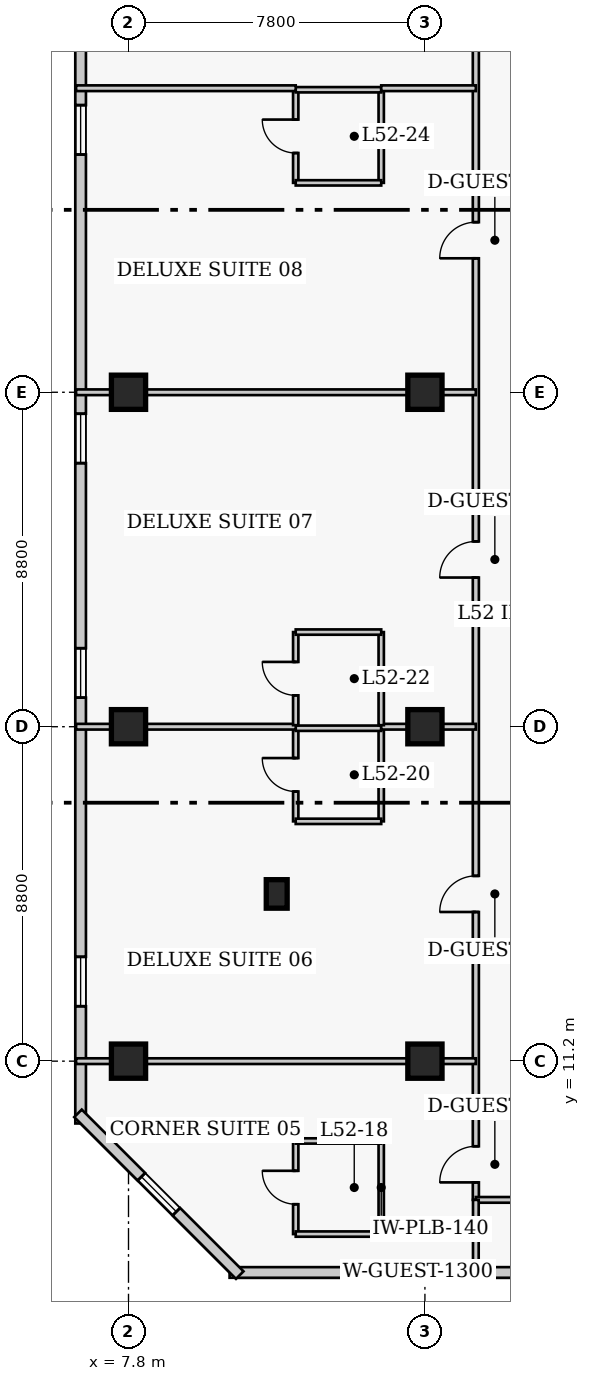
"""IFC4 building model, lengths in metres.
Left out: names, types, materials, properties, quantities, classifications, styles, units other than length and angle.
Written with IfcOpenShell. Run it as: python <this file> out.ifc"""

import sys

from ifc_helpers import new_model, si_unit, direction, frame, frame_2d, origin, origin_2d, place, context, subcontext, project, spatial, rectangle, extrude, element, fill, save


model = new_model("IFC4")
c1 = context("Model", 3, precision=1e-05, world=origin(), true_north=direction((0.0, 1.0)))
c2 = subcontext(c1, "Body", "Model", "MODEL_VIEW")
j1 = project(units=[si_unit("LENGTHUNIT", "METRE"), si_unit("PLANEANGLEUNIT", "RADIAN")], contexts=[c1])
p1 = place(None, origin())
s1 = spatial("IfcSite", under=j1, at=p1, CompositionType="ELEMENT")
p2 = place(p1, origin())
s2 = spatial("IfcBuilding", under=s1, at=p2, CompositionType="ELEMENT")
p3 = place(p2, frame((0.0, 0.0, 208.5)))
s3 = spatial("IfcBuildingStorey", under=s2, at=p3, CompositionType="ELEMENT", Elevation=208.5)
for number, where, z_axis, x_axis in (
    (1, (7.8, 11.2, 0.0), (0.0, 0.0, 1.0), (1.0, 0.0, 0.0)),
    (2, (7.8, 20.0, 0.0), (0.0, 0.0, 1.0), (1.0, 0.0, 0.0)),
    (3, (7.8, 28.8, 0.0), (0.0, 0.0, 1.0), (1.0, 0.0, 0.0)),
    (4, (15.6, 11.2, 0.0), (0.0, 0.0, 1.0), (1.0, 0.0, 0.0)),
    (5, (15.6, 20.0, 0.0), (0.0, 0.0, 1.0), (1.0, 0.0, 0.0)),
    (6, (15.6, 28.8, 0.0), (0.0, 0.0, 1.0), (1.0, 0.0, 0.0)),
):
    element("IfcColumn", number, at=place(p3, frame(where, z_axis=z_axis, x_axis=x_axis)), inside=s3, PredefinedType="COLUMN", context=c2, shape_type="SweptSolid", body=[
        extrude(rectangle(XDim=0.9, YDim=0.9, at=origin_2d()), origin(), (0.0, 0.0, 1.0), 3.9),
    ])
p4 = place(p3, frame((11.7, 15.6, 0.0), z_axis=(0.0, 0.0, 1.0), x_axis=(1.0, 0.0, 0.0)))
e7 = element("IfcColumn", 7, at=p4, inside=s3, PredefinedType="PILASTER", context=c2, shape_type="SweptSolid", body=[
    extrude(rectangle(XDim=0.55, YDim=0.75, at=origin_2d()), origin(), (0.0, 0.0, 1.0), 3.9),
])
p5 = place(p3, frame((10.46, 5.64, 0.0), z_axis=(0.0, 0.0, 1.0), x_axis=(1.0, 0.0, 0.0)))
e8 = element("IfcWall", 8, at=p5, inside=s3, PredefinedType="SOLIDWALL", context=c2, shape_type="SweptSolid", body=[
    extrude(rectangle(XDim=25.83, YDim=0.28, at=frame_2d((12.915, 0.0))), origin(), (0.0, 0.0, 1.0), 3.65),
])
p6 = place(p5, frame((16.14, 0.0, 0.0)))
e9 = element("IfcOpeningElement", 9, at=p6, cuts=e8, PredefinedType="OPENING", context=c2, shape_type="SweptSolid", body=[
    extrude(rectangle(XDim=1.4, YDim=2.15, at=frame_2d((0.7, 1.075))), frame((0.0, 0.15, 0.0), z_axis=(0.0, -1.0, 0.0), x_axis=(1.0, 0.0, 0.0)), (0.0, 0.0, 1.0), 0.3),
])
p7 = place(p5, frame((4.305, 0.0, 0.85)))
e10 = element("IfcOpeningElement", 10, at=p7, cuts=e8, PredefinedType="OPENING", context=c2, shape_type="SweptSolid", body=[
    extrude(rectangle(XDim=1.3, YDim=1.7, at=frame_2d((0.65, 0.85))), frame((0.0, 0.15, 0.0), z_axis=(0.0, -1.0, 0.0), x_axis=(1.0, 0.0, 0.0)), (0.0, 0.0, 1.0), 0.3),
])
p8 = place(p5, frame((11.615, 0.0, 0.85)))
e11 = element("IfcOpeningElement", 11, at=p8, cuts=e8, PredefinedType="OPENING", context=c2, shape_type="SweptSolid", body=[
    extrude(rectangle(XDim=1.3, YDim=1.7, at=frame_2d((0.65, 0.85))), frame((0.0, 0.15, 0.0), z_axis=(0.0, -1.0, 0.0), x_axis=(1.0, 0.0, 0.0)), (0.0, 0.0, 1.0), 0.3),
])
p9 = place(p5, frame((20.875, 0.0, 0.85)))
e12 = element("IfcOpeningElement", 12, at=p9, cuts=e8, PredefinedType="OPENING", context=c2, shape_type="SweptSolid", body=[
    extrude(rectangle(XDim=1.3, YDim=1.7, at=frame_2d((0.65, 0.85))), frame((0.0, 0.15, 0.0), z_axis=(0.0, -1.0, 0.0), x_axis=(1.0, 0.0, 0.0)), (0.0, 0.0, 1.0), 0.3),
])
p10 = place(p3, frame((6.54, 39.44, 0.0), z_axis=(0.0, 0.0, 1.0), x_axis=(0.0, -1.0, 0.0)))
e13 = element("IfcWall", 13, at=p10, inside=s3, PredefinedType="SOLIDWALL", context=c2, shape_type="SweptSolid", body=[
    extrude(rectangle(XDim=29.88, YDim=0.28, at=frame_2d((14.94, 0.0))), origin(), (0.0, 0.0, 1.0), 3.65),
])
p11 = place(p10, frame((3.085, 0.0, 0.85)))
e14 = element("IfcOpeningElement", 14, at=p11, cuts=e13, PredefinedType="OPENING", context=c2, shape_type="SweptSolid", body=[
    extrude(rectangle(XDim=1.3, YDim=1.7, at=frame_2d((0.65, 0.85))), frame((0.0, 0.15, 0.0), z_axis=(0.0, -1.0, 0.0), x_axis=(1.0, 0.0, 0.0)), (0.0, 0.0, 1.0), 0.3),
])
p12 = place(p10, frame((11.205, 0.0, 0.85)))
e15 = element("IfcOpeningElement", 15, at=p12, cuts=e13, PredefinedType="OPENING", context=c2, shape_type="SweptSolid", body=[
    extrude(rectangle(XDim=1.3, YDim=1.7, at=frame_2d((0.65, 0.85))), frame((0.0, 0.15, 0.0), z_axis=(0.0, -1.0, 0.0), x_axis=(1.0, 0.0, 0.0)), (0.0, 0.0, 1.0), 0.3),
])
p13 = place(p10, frame((17.375, 0.0, 0.85)))
e16 = element("IfcOpeningElement", 16, at=p13, cuts=e13, PredefinedType="OPENING", context=c2, shape_type="SweptSolid", body=[
    extrude(rectangle(XDim=1.3, YDim=1.7, at=frame_2d((0.65, 0.85))), frame((0.0, 0.15, 0.0), z_axis=(0.0, -1.0, 0.0), x_axis=(1.0, 0.0, 0.0)), (0.0, 0.0, 1.0), 0.3),
])
p14 = place(p10, frame((25.495, 0.0, 0.85)))
e17 = element("IfcOpeningElement", 17, at=p14, cuts=e13, PredefinedType="OPENING", context=c2, shape_type="SweptSolid", body=[
    extrude(rectangle(XDim=1.3, YDim=1.7, at=frame_2d((0.65, 0.85))), frame((0.0, 0.15, 0.0), z_axis=(0.0, -1.0, 0.0), x_axis=(1.0, 0.0, 0.0)), (0.0, 0.0, 1.0), 0.3),
])
p15 = place(p3, frame((6.471, 9.827, 0.0), z_axis=(0.0, 0.0, 1.0), x_axis=(0.707106781187, -0.707106781187, 0.0)))
e18 = element("IfcWall", 18, at=p15, inside=s3, PredefinedType="SOLIDWALL", context=c2, shape_type="SweptSolid", body=[
    extrude(rectangle(XDim=6.02, YDim=0.28, at=frame_2d((3.01, 0.0))), origin(), (0.0, 0.0, 1.0), 3.65),
])
p16 = place(p15, frame((2.36, 0.0, 0.85)))
e19 = element("IfcOpeningElement", 19, at=p16, cuts=e18, PredefinedType="OPENING", context=c2, shape_type="SweptSolid", body=[
    extrude(rectangle(XDim=1.3, YDim=1.7, at=frame_2d((0.65, 0.85))), frame((0.0, 0.15, 0.0), z_axis=(0.0, -1.0, 0.0), x_axis=(1.0, 0.0, 0.0)), (0.0, 0.0, 1.0), 0.3),
])
p17 = place(p3, frame((16.94, 7.55, 0.0), z_axis=(0.0, 0.0, 1.0), x_axis=(0.0, 1.0, 0.0)))
e20 = element("IfcWall", 20, at=p17, inside=s3, PredefinedType="PARTITIONING", context=c2, shape_type="SweptSolid", body=[
    extrude(rectangle(XDim=33.1, YDim=0.16, at=frame_2d((16.55, 0.0))), origin(), (0.0, 0.0, 1.0), 3.65),
])
p18 = place(p17, frame((0.46, 0.0, 0.0)))
e21 = element("IfcOpeningElement", 21, at=p18, cuts=e20, PredefinedType="OPENING", context=c2, shape_type="SweptSolid", body=[
    extrude(rectangle(XDim=0.95, YDim=2.1, at=frame_2d((0.475, 1.05))), frame((0.0, 0.09, 0.0), z_axis=(0.0, -1.0, 0.0), x_axis=(1.0, 0.0, 0.0)), (0.0, 0.0, 1.0), 0.18),
])
p19 = place(p17, frame((7.575, 0.0, 0.0)))
e22 = element("IfcOpeningElement", 22, at=p19, cuts=e20, PredefinedType="OPENING", context=c2, shape_type="SweptSolid", body=[
    extrude(rectangle(XDim=0.95, YDim=2.1, at=frame_2d((0.475, 1.05))), frame((0.0, 0.09, 0.0), z_axis=(0.0, -1.0, 0.0), x_axis=(1.0, 0.0, 0.0)), (0.0, 0.0, 1.0), 0.18),
])
p20 = place(p17, frame((16.375, 0.0, 0.0)))
e23 = element("IfcOpeningElement", 23, at=p20, cuts=e20, PredefinedType="OPENING", context=c2, shape_type="SweptSolid", body=[
    extrude(rectangle(XDim=0.95, YDim=2.1, at=frame_2d((0.475, 1.05))), frame((0.0, 0.09, 0.0), z_axis=(0.0, -1.0, 0.0), x_axis=(1.0, 0.0, 0.0)), (0.0, 0.0, 1.0), 0.18),
])
p21 = place(p17, frame((24.775, 0.0, 0.0)))
e24 = element("IfcOpeningElement", 24, at=p21, cuts=e20, PredefinedType="OPENING", context=c2, shape_type="SweptSolid", body=[
    extrude(rectangle(XDim=0.95, YDim=2.1, at=frame_2d((0.475, 1.05))), frame((0.0, 0.09, 0.0), z_axis=(0.0, -1.0, 0.0), x_axis=(1.0, 0.0, 0.0)), (0.0, 0.0, 1.0), 0.18),
])
p22 = place(p17, frame((31.66, 0.0, 0.0)))
e25 = element("IfcOpeningElement", 25, at=p22, cuts=e20, PredefinedType="OPENING", context=c2, shape_type="SweptSolid", body=[
    extrude(rectangle(XDim=1.0, YDim=2.15, at=frame_2d((0.5, 1.075))), frame((0.0, 0.09, 0.0), z_axis=(0.0, -1.0, 0.0), x_axis=(1.0, 0.0, 0.0)), (0.0, 0.0, 1.0), 0.18),
])
p23 = place(p3, frame((16.94, 7.55, 0.0), z_axis=(0.0, 0.0, 1.0), x_axis=(1.0, 0.0, 0.0)))
e26 = element("IfcWall", 26, at=p23, inside=s3, PredefinedType="PARTITIONING", context=c2, shape_type="SweptSolid", body=[
    extrude(rectangle(XDim=2.22, YDim=0.15, at=frame_2d((1.11, 0.0))), origin(), (0.0, 0.0, 1.0), 3.65),
])
p24 = place(p3, frame((16.94, 5.52, 0.0), z_axis=(0.0, 0.0, 1.0), x_axis=(0.0, 1.0, 0.0)))
e27 = element("IfcWall", 27, at=p24, inside=s3, PredefinedType="PARTITIONING", context=c2, shape_type="SweptSolid", body=[
    extrude(rectangle(XDim=2.03, YDim=0.15, at=frame_2d((1.015, 0.0))), origin(), (0.0, 0.0, 1.0), 3.65),
])
p25 = place(p3, frame((12.2, 6.65, 0.0), z_axis=(0.0, 0.0, 1.0), x_axis=(0.0, 1.0, 0.0)))
e28 = element("IfcWall", 28, at=p25, inside=s3, PredefinedType="PLUMBINGWALL", context=c2, shape_type="SweptSolid", body=[
    extrude(rectangle(XDim=2.45, YDim=0.14, at=frame_2d((1.225, 0.0))), origin(), (0.0, 0.0, 1.0), 3.65),
])
p26 = place(p25, frame((0.785, 0.0, 0.0)))
e29 = element("IfcOpeningElement", 29, at=p26, cuts=e28, PredefinedType="OPENING", context=c2, shape_type="SweptSolid", body=[
    extrude(rectangle(XDim=0.88, YDim=2.05, at=frame_2d((0.44, 1.025))), frame((0.0, 0.08, 0.0), z_axis=(0.0, -1.0, 0.0), x_axis=(1.0, 0.0, 0.0)), (0.0, 0.0, 1.0), 0.16),
])
p27 = place(p3, frame((14.45, 6.65, 0.0), z_axis=(0.0, 0.0, 1.0), x_axis=(0.0, 1.0, 0.0)))
e30 = element("IfcWall", 30, at=p27, inside=s3, PredefinedType="PLUMBINGWALL", context=c2, shape_type="SweptSolid", body=[
    extrude(rectangle(XDim=2.45, YDim=0.14, at=frame_2d((1.225, 0.0))), origin(), (0.0, 0.0, 1.0), 3.65),
])
for number, where, z_axis, x_axis in (
    (31, (12.2, 6.65, 0.0), (0.0, 0.0, 1.0), (1.0, 0.0, 0.0)),
    (32, (12.2, 9.1, 0.0), (0.0, 0.0, 1.0), (1.0, 0.0, 0.0)),
):
    element("IfcWall", number, at=place(p3, frame(where, z_axis=z_axis, x_axis=x_axis)), inside=s3, PredefinedType="PLUMBINGWALL", context=c2, shape_type="SweptSolid", body=[
        extrude(rectangle(XDim=2.25, YDim=0.14, at=frame_2d((1.125, 0.0))), origin(), (0.0, 0.0, 1.0), 3.65),
    ])
p28 = place(p3, frame((6.42, 11.2, 0.0), z_axis=(0.0, 0.0, 1.0), x_axis=(1.0, 0.0, 0.0)))
e33 = element("IfcWall", 33, at=p28, inside=s3, PredefinedType="PARTITIONING", context=c2, shape_type="SweptSolid", body=[
    extrude(rectangle(XDim=10.52, YDim=0.15, at=frame_2d((5.26, 0.0))), origin(), (0.0, 0.0, 1.0), 2.878),
])
p29 = place(p3, frame((12.2, 17.51, 0.0), z_axis=(0.0, 0.0, 1.0), x_axis=(0.0, 1.0, 0.0)))
e34 = element("IfcWall", 34, at=p29, inside=s3, PredefinedType="PLUMBINGWALL", context=c2, shape_type="SweptSolid", body=[
    extrude(rectangle(XDim=2.45, YDim=0.14, at=frame_2d((1.225, 0.0))), origin(), (0.0, 0.0, 1.0), 3.65),
])
p30 = place(p29, frame((0.785, 0.0, 0.0)))
e35 = element("IfcOpeningElement", 35, at=p30, cuts=e34, PredefinedType="OPENING", context=c2, shape_type="SweptSolid", body=[
    extrude(rectangle(XDim=0.88, YDim=2.05, at=frame_2d((0.44, 1.025))), frame((0.0, 0.08, 0.0), z_axis=(0.0, -1.0, 0.0), x_axis=(1.0, 0.0, 0.0)), (0.0, 0.0, 1.0), 0.16),
])
p31 = place(p3, frame((14.45, 17.51, 0.0), z_axis=(0.0, 0.0, 1.0), x_axis=(0.0, 1.0, 0.0)))
e36 = element("IfcWall", 36, at=p31, inside=s3, PredefinedType="PLUMBINGWALL", context=c2, shape_type="SweptSolid", body=[
    extrude(rectangle(XDim=2.45, YDim=0.14, at=frame_2d((1.225, 0.0))), origin(), (0.0, 0.0, 1.0), 3.65),
])
p32 = place(p3, frame((12.2, 17.51, 0.0), z_axis=(0.0, 0.0, 1.0), x_axis=(1.0, 0.0, 0.0)))
e37 = element("IfcWall", 37, at=p32, inside=s3, PredefinedType="PLUMBINGWALL", context=c2, shape_type="SweptSolid", body=[
    extrude(rectangle(XDim=2.25, YDim=0.14, at=frame_2d((1.125, 0.0))), origin(), (0.0, 0.0, 1.0), 3.65),
])
p33 = place(p3, frame((12.2, 19.96, 0.0), z_axis=(0.0, 0.0, 1.0), x_axis=(1.0, 0.0, 0.0)))
e38 = element("IfcWall", 38, at=p33, inside=s3, PredefinedType="PLUMBINGWALL", context=c2, shape_type="SweptSolid", body=[
    extrude(rectangle(XDim=2.25, YDim=0.14, at=frame_2d((1.125, 0.0))), origin(), (0.0, 0.0, 1.0), 3.038),
])
p34 = place(p3, frame((6.42, 20.0, 0.0), z_axis=(0.0, 0.0, 1.0), x_axis=(1.0, 0.0, 0.0)))
e39 = element("IfcWall", 39, at=p34, inside=s3, PredefinedType="PARTITIONING", context=c2, shape_type="SweptSolid", body=[
    extrude(rectangle(XDim=5.78, YDim=0.15, at=frame_2d((2.89, 0.0))), origin(), (0.0, 0.0, 1.0), 2.878),
])
p35 = place(p3, frame((14.45, 20.0, 0.0), z_axis=(0.0, 0.0, 1.0), x_axis=(1.0, 0.0, 0.0)))
e40 = element("IfcWall", 40, at=p35, inside=s3, PredefinedType="PARTITIONING", context=c2, shape_type="SweptSolid", body=[
    extrude(rectangle(XDim=2.49, YDim=0.15, at=frame_2d((1.245, 0.0))), origin(), (0.0, 0.0, 1.0), 2.878),
])
p36 = place(p3, frame((12.2, 20.04, 0.0), z_axis=(0.0, 0.0, 1.0), x_axis=(0.0, 1.0, 0.0)))
e41 = element("IfcWall", 41, at=p36, inside=s3, PredefinedType="PLUMBINGWALL", context=c2, shape_type="SweptSolid", body=[
    extrude(rectangle(XDim=2.45, YDim=0.14, at=frame_2d((1.225, 0.0))), origin(), (0.0, 0.0, 1.0), 3.65),
])
p37 = place(p36, frame((0.785, 0.0, 0.0)))
e42 = element("IfcOpeningElement", 42, at=p37, cuts=e41, PredefinedType="OPENING", context=c2, shape_type="SweptSolid", body=[
    extrude(rectangle(XDim=0.88, YDim=2.05, at=frame_2d((0.44, 1.025))), frame((0.0, 0.08, 0.0), z_axis=(0.0, -1.0, 0.0), x_axis=(1.0, 0.0, 0.0)), (0.0, 0.0, 1.0), 0.16),
])
p38 = place(p3, frame((14.45, 20.04, 0.0), z_axis=(0.0, 0.0, 1.0), x_axis=(0.0, 1.0, 0.0)))
e43 = element("IfcWall", 43, at=p38, inside=s3, PredefinedType="PLUMBINGWALL", context=c2, shape_type="SweptSolid", body=[
    extrude(rectangle(XDim=2.45, YDim=0.14, at=frame_2d((1.225, 0.0))), origin(), (0.0, 0.0, 1.0), 3.65),
])
p39 = place(p3, frame((12.2, 22.49, 0.0), z_axis=(0.0, 0.0, 1.0), x_axis=(1.0, 0.0, 0.0)))
e44 = element("IfcWall", 44, at=p39, inside=s3, PredefinedType="PLUMBINGWALL", context=c2, shape_type="SweptSolid", body=[
    extrude(rectangle(XDim=2.25, YDim=0.14, at=frame_2d((1.125, 0.0))), origin(), (0.0, 0.0, 1.0), 3.65),
])
p40 = place(p3, frame((6.42, 28.8, 0.0), z_axis=(0.0, 0.0, 1.0), x_axis=(1.0, 0.0, 0.0)))
e45 = element("IfcWall", 45, at=p40, inside=s3, PredefinedType="PARTITIONING", context=c2, shape_type="SweptSolid", body=[
    extrude(rectangle(XDim=10.52, YDim=0.15, at=frame_2d((5.26, 0.0))), origin(), (0.0, 0.0, 1.0), 2.878),
])
p41 = place(p3, frame((12.2, 34.31, 0.0), z_axis=(0.0, 0.0, 1.0), x_axis=(0.0, 1.0, 0.0)))
e46 = element("IfcWall", 46, at=p41, inside=s3, PredefinedType="PLUMBINGWALL", context=c2, shape_type="SweptSolid", body=[
    extrude(rectangle(XDim=2.45, YDim=0.14, at=frame_2d((1.225, 0.0))), origin(), (0.0, 0.0, 1.0), 3.65),
])
p42 = place(p41, frame((0.785, 0.0, 0.0)))
e47 = element("IfcOpeningElement", 47, at=p42, cuts=e46, PredefinedType="OPENING", context=c2, shape_type="SweptSolid", body=[
    extrude(rectangle(XDim=0.88, YDim=2.05, at=frame_2d((0.44, 1.025))), frame((0.0, 0.08, 0.0), z_axis=(0.0, -1.0, 0.0), x_axis=(1.0, 0.0, 0.0)), (0.0, 0.0, 1.0), 0.16),
])
p43 = place(p3, frame((14.45, 34.31, 0.0), z_axis=(0.0, 0.0, 1.0), x_axis=(0.0, 1.0, 0.0)))
e48 = element("IfcWall", 48, at=p43, inside=s3, PredefinedType="PLUMBINGWALL", context=c2, shape_type="SweptSolid", body=[
    extrude(rectangle(XDim=2.45, YDim=0.14, at=frame_2d((1.225, 0.0))), origin(), (0.0, 0.0, 1.0), 3.65),
])
for number, where, z_axis, x_axis in (
    (49, (12.2, 34.31, 0.0), (0.0, 0.0, 1.0), (1.0, 0.0, 0.0)),
    (50, (12.2, 36.76, 0.0), (0.0, 0.0, 1.0), (1.0, 0.0, 0.0)),
):
    element("IfcWall", number, at=place(p3, frame(where, z_axis=z_axis, x_axis=x_axis)), inside=s3, PredefinedType="PLUMBINGWALL", context=c2, shape_type="SweptSolid", body=[
        extrude(rectangle(XDim=2.25, YDim=0.14, at=frame_2d((1.125, 0.0))), origin(), (0.0, 0.0, 1.0), 3.65),
    ])
p44 = place(p3, frame((6.42, 36.8, 0.0), z_axis=(0.0, 0.0, 1.0), x_axis=(1.0, 0.0, 0.0)))
e51 = element("IfcWall", 51, at=p44, inside=s3, PredefinedType="PARTITIONING", context=c2, shape_type="SweptSolid", body=[
    extrude(rectangle(XDim=5.78, YDim=0.15, at=frame_2d((2.89, 0.0))), origin(), (0.0, 0.0, 1.0), 3.65),
])
p45 = place(p3, frame((14.45, 36.8, 0.0), z_axis=(0.0, 0.0, 1.0), x_axis=(1.0, 0.0, 0.0)))
e52 = element("IfcWall", 52, at=p45, inside=s3, PredefinedType="PARTITIONING", context=c2, shape_type="SweptSolid", body=[
    extrude(rectangle(XDim=2.49, YDim=0.15, at=frame_2d((1.245, 0.0))), origin(), (0.0, 0.0, 1.0), 3.65),
])
p46 = place(p7, origin())
e53 = element("IfcWindow", 53, at=p46, inside=s3, PartitioningType="SINGLE_PANEL", PredefinedType="WINDOW", context=c2, shape_type="SweptSolid", body=[
    extrude(rectangle(XDim=1.3, YDim=1.7, at=frame_2d((0.65, 0.85))), frame((0.0, 0.03, 0.0), z_axis=(0.0, -1.0, 0.0), x_axis=(1.0, 0.0, 0.0)), (0.0, 0.0, 1.0), 0.06),
])
fill(e10, e53)
p47 = place(p11, origin())
e54 = element("IfcWindow", 54, at=p47, inside=s3, PartitioningType="SINGLE_PANEL", PredefinedType="WINDOW", context=c2, shape_type="SweptSolid", body=[
    extrude(rectangle(XDim=1.3, YDim=1.7, at=frame_2d((0.65, 0.85))), frame((0.0, 0.03, 0.0), z_axis=(0.0, -1.0, 0.0), x_axis=(1.0, 0.0, 0.0)), (0.0, 0.0, 1.0), 0.06),
])
fill(e14, e54)
p48 = place(p12, origin())
e55 = element("IfcWindow", 55, at=p48, inside=s3, PartitioningType="SINGLE_PANEL", PredefinedType="WINDOW", context=c2, shape_type="SweptSolid", body=[
    extrude(rectangle(XDim=1.3, YDim=1.7, at=frame_2d((0.65, 0.85))), frame((0.0, 0.03, 0.0), z_axis=(0.0, -1.0, 0.0), x_axis=(1.0, 0.0, 0.0)), (0.0, 0.0, 1.0), 0.06),
])
fill(e15, e55)
p49 = place(p13, origin())
e56 = element("IfcWindow", 56, at=p49, inside=s3, PartitioningType="SINGLE_PANEL", PredefinedType="WINDOW", context=c2, shape_type="SweptSolid", body=[
    extrude(rectangle(XDim=1.3, YDim=1.7, at=frame_2d((0.65, 0.85))), frame((0.0, 0.03, 0.0), z_axis=(0.0, -1.0, 0.0), x_axis=(1.0, 0.0, 0.0)), (0.0, 0.0, 1.0), 0.06),
])
fill(e16, e56)
p50 = place(p14, origin())
e57 = element("IfcWindow", 57, at=p50, inside=s3, PartitioningType="SINGLE_PANEL", PredefinedType="WINDOW", context=c2, shape_type="SweptSolid", body=[
    extrude(rectangle(XDim=1.3, YDim=1.7, at=frame_2d((0.65, 0.85))), frame((0.0, 0.03, 0.0), z_axis=(0.0, -1.0, 0.0), x_axis=(1.0, 0.0, 0.0)), (0.0, 0.0, 1.0), 0.06),
])
fill(e17, e57)
p51 = place(p16, origin())
e58 = element("IfcWindow", 58, at=p51, inside=s3, PartitioningType="SINGLE_PANEL", PredefinedType="WINDOW", context=c2, shape_type="SweptSolid", body=[
    extrude(rectangle(XDim=1.3, YDim=1.7, at=frame_2d((0.65, 0.85))), frame((0.0, 0.03, 0.0), z_axis=(0.0, -1.0, 0.0), x_axis=(1.0, 0.0, 0.0)), (0.0, 0.0, 1.0), 0.06),
])
fill(e19, e58)
p52 = place(p26, origin())
e59 = element("IfcDoor", 59, at=p52, inside=s3, OperationType="SINGLE_SWING_RIGHT", PredefinedType="DOOR", context=c2, shape_type="SweptSolid", body=[
    extrude(rectangle(XDim=0.88, YDim=2.05, at=frame_2d((0.44, 1.025))), frame((0.0, 0.025, 0.0), z_axis=(0.0, -1.0, 0.0), x_axis=(1.0, 0.0, 0.0)), (0.0, 0.0, 1.0), 0.05),
])
fill(e29, e59)
p53 = place(p18, origin())
e60 = element("IfcDoor", 60, at=p53, inside=s3, OperationType="SINGLE_SWING_LEFT", PredefinedType="DOOR", context=c2, shape_type="SweptSolid", body=[
    extrude(rectangle(XDim=0.95, YDim=2.1, at=frame_2d((0.475, 1.05))), frame((0.0, 0.025, 0.0), z_axis=(0.0, -1.0, 0.0), x_axis=(1.0, 0.0, 0.0)), (0.0, 0.0, 1.0), 0.05),
])
fill(e21, e60)
p54 = place(p30, origin())
e61 = element("IfcDoor", 61, at=p54, inside=s3, OperationType="SINGLE_SWING_RIGHT", PredefinedType="DOOR", context=c2, shape_type="SweptSolid", body=[
    extrude(rectangle(XDim=0.88, YDim=2.05, at=frame_2d((0.44, 1.025))), frame((0.0, 0.025, 0.0), z_axis=(0.0, -1.0, 0.0), x_axis=(1.0, 0.0, 0.0)), (0.0, 0.0, 1.0), 0.05),
])
fill(e35, e61)
p55 = place(p19, origin())
e62 = element("IfcDoor", 62, at=p55, inside=s3, OperationType="SINGLE_SWING_LEFT", PredefinedType="DOOR", context=c2, shape_type="SweptSolid", body=[
    extrude(rectangle(XDim=0.95, YDim=2.1, at=frame_2d((0.475, 1.05))), frame((0.0, 0.025, 0.0), z_axis=(0.0, -1.0, 0.0), x_axis=(1.0, 0.0, 0.0)), (0.0, 0.0, 1.0), 0.05),
])
fill(e22, e62)
p56 = place(p37, origin())
e63 = element("IfcDoor", 63, at=p56, inside=s3, OperationType="SINGLE_SWING_RIGHT", PredefinedType="DOOR", context=c2, shape_type="SweptSolid", body=[
    extrude(rectangle(XDim=0.88, YDim=2.05, at=frame_2d((0.44, 1.025))), frame((0.0, 0.025, 0.0), z_axis=(0.0, -1.0, 0.0), x_axis=(1.0, 0.0, 0.0)), (0.0, 0.0, 1.0), 0.05),
])
fill(e42, e63)
p57 = place(p20, origin())
e64 = element("IfcDoor", 64, at=p57, inside=s3, OperationType="SINGLE_SWING_LEFT", PredefinedType="DOOR", context=c2, shape_type="SweptSolid", body=[
    extrude(rectangle(XDim=0.95, YDim=2.1, at=frame_2d((0.475, 1.05))), frame((0.0, 0.025, 0.0), z_axis=(0.0, -1.0, 0.0), x_axis=(1.0, 0.0, 0.0)), (0.0, 0.0, 1.0), 0.05),
])
fill(e23, e64)
p58 = place(p42, origin())
e65 = element("IfcDoor", 65, at=p58, inside=s3, OperationType="SINGLE_SWING_RIGHT", PredefinedType="DOOR", context=c2, shape_type="SweptSolid", body=[
    extrude(rectangle(XDim=0.88, YDim=2.05, at=frame_2d((0.44, 1.025))), frame((0.0, 0.025, 0.0), z_axis=(0.0, -1.0, 0.0), x_axis=(1.0, 0.0, 0.0)), (0.0, 0.0, 1.0), 0.05),
])
fill(e47, e65)
p59 = place(p21, origin())
e66 = element("IfcDoor", 66, at=p59, inside=s3, OperationType="SINGLE_SWING_LEFT", PredefinedType="DOOR", context=c2, shape_type="SweptSolid", body=[
    extrude(rectangle(XDim=0.95, YDim=2.1, at=frame_2d((0.475, 1.05))), frame((0.0, 0.025, 0.0), z_axis=(0.0, -1.0, 0.0), x_axis=(1.0, 0.0, 0.0)), (0.0, 0.0, 1.0), 0.05),
])
fill(e24, e66)
save(model, sys.argv[1])
